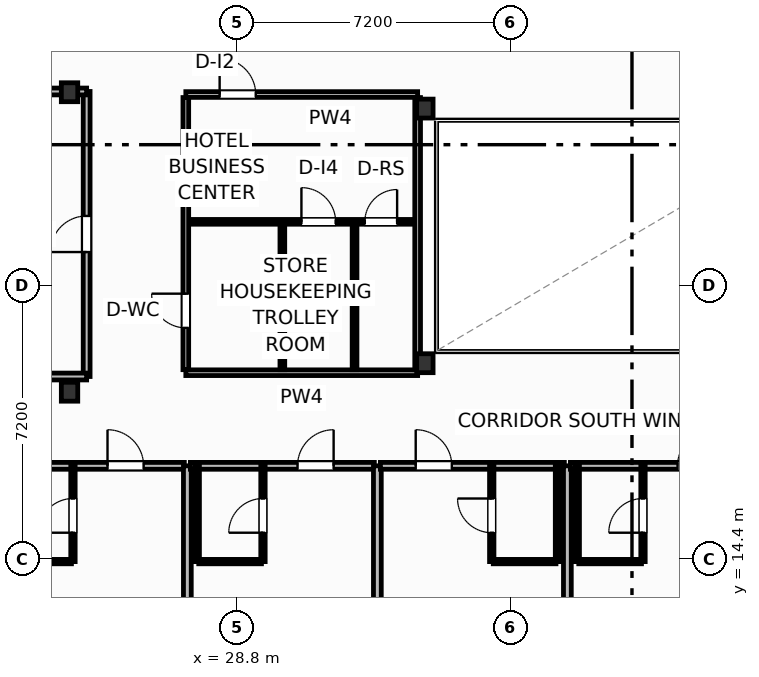
"""IFC4 building model, lengths in metres.
Left out: names, types, materials, properties, quantities, classifications, styles, units other than length and angle.
Written with IfcOpenShell. Run it as: python <this file> out.ifc"""

import sys

from ifc_helpers import new_model, si_unit, direction, frame, frame_2d, origin, origin_2d, place, context, subcontext, project, spatial, rectangle, i_section, extrude, element, fill, save


model = new_model("IFC4")
c1 = context("Model", 3, precision=1e-05, world=origin(), true_north=direction((0.0, 1.0)))
c2 = subcontext(c1, "Body", "Model", "MODEL_VIEW")
j1 = project(units=[si_unit("LENGTHUNIT", "METRE"), si_unit("PLANEANGLEUNIT", "RADIAN")], contexts=[c1])
p1 = place(None, origin())
s1 = spatial("IfcSite", under=j1, at=p1, CompositionType="ELEMENT")
p2 = place(p1, origin())
s2 = spatial("IfcBuilding", under=s1, at=p2, CompositionType="ELEMENT")
p3 = place(p2, frame((0.0, 0.0, 30.7)))
s3 = spatial("IfcBuildingStorey", under=s2, at=p3, CompositionType="ELEMENT", Elevation=30.7)
for number, where, z_axis, x_axis in (
    (1, (33.75, 19.55, 0.0), (0.0, 0.0, 1.0), (1.0, 0.0, 0.0)),
    (2, (33.75, 26.25, 0.0), (0.0, 0.0, 1.0), (1.0, 0.0, 0.0)),
    (3, (24.4, 18.8, 0.0), (0.0, 0.0, 1.0), (1.0, 0.0, 0.0)),
    (4, (24.4, 26.68, 0.0), (0.0, 0.0, 1.0), (1.0, 0.0, 0.0)),
):
    element("IfcColumn", number, at=place(p3, frame(where, z_axis=z_axis, x_axis=x_axis)), inside=s3, PredefinedType="COLUMN", context=c2, shape_type="SweptSolid", body=[
        extrude(i_section(OverallWidth=0.432, OverallDepth=0.498, WebThickness=0.056, FlangeThickness=0.089, FilletRadius=0.025, at=origin_2d()), origin(), (0.0, 0.0, 1.0), 3.7),
    ])
p4 = place(p3, frame((22.58, 16.85, 0.0), z_axis=(0.0, 0.0, 1.0), x_axis=(1.0, 0.0, 0.0)))
e5 = element("IfcWall", 5, at=p4, inside=s3, PredefinedType="PARTITIONING", context=c2, shape_type="SweptSolid", body=[
    extrude(rectangle(XDim=4.84, YDim=0.18, at=frame_2d((2.42, 0.0))), origin(), (0.0, 0.0, 1.0), 3.45),
])
p5 = place(p4, frame((2.819, 0.0, 0.0)))
e6 = element("IfcOpeningElement", 6, at=p5, cuts=e5, PredefinedType="OPENING", context=c2, shape_type="SweptSolid", body=[
    extrude(rectangle(XDim=0.95, YDim=2.15, at=frame_2d((0.475, 1.075))), frame((0.0, 0.1, 0.0), z_axis=(0.0, -1.0, 0.0), x_axis=(1.0, 0.0, 0.0)), (0.0, 0.0, 1.0), 0.2),
])
p6 = place(p3, frame((22.8, 14.33, 0.0), z_axis=(0.0, 0.0, 1.0), x_axis=(1.0, 0.0, 0.0)))
e7 = element("IfcWall", 7, at=p6, inside=s3, PredefinedType="PARTITIONING", context=c2, shape_type="SweptSolid", body=[
    extrude(rectangle(XDim=1.65, YDim=0.115, at=frame_2d((0.825, 0.0))), origin(), (0.0, 0.0, 1.0), 3.45),
])
p7 = place(p3, frame((24.49, 14.33, 0.0), z_axis=(0.0, 0.0, 1.0), x_axis=(0.0, 1.0, 0.0)))
e8 = element("IfcWall", 8, at=p7, inside=s3, PredefinedType="PARTITIONING", context=c2, shape_type="SweptSolid", body=[
    extrude(rectangle(XDim=2.52, YDim=0.115, at=frame_2d((1.26, 0.0))), origin(), (0.0, 0.0, 1.0), 3.45),
])
p8 = place(p7, frame((0.76, 0.0, 0.0)))
e9 = element("IfcOpeningElement", 9, at=p8, cuts=e8, PredefinedType="OPENING", context=c2, shape_type="SweptSolid", body=[
    extrude(rectangle(XDim=0.9, YDim=2.05, at=frame_2d((0.45, 1.025))), frame((0.0, 0.067, 0.0), z_axis=(0.0, -1.0, 0.0), x_axis=(1.0, 0.0, 0.0)), (0.0, 0.0, 1.0), 0.135),
])
p9 = place(p3, frame((27.5, 2.808, 0.0), z_axis=(0.0, 0.0, 1.0), x_axis=(0.0, 1.0, 0.0)))
e10 = element("IfcWall", 10, at=p9, inside=s3, PredefinedType="PARTITIONING", context=c2, shape_type="SweptSolid", body=[
    extrude(rectangle(XDim=14.042, YDim=0.205, at=frame_2d((7.021, 0.0))), origin(), (0.0, 0.0, 1.0), 3.45),
])
p10 = place(p3, frame((27.58, 16.85, 0.0), z_axis=(0.0, 0.0, 1.0), x_axis=(1.0, 0.0, 0.0)))
e11 = element("IfcWall", 11, at=p10, inside=s3, PredefinedType="PARTITIONING", context=c2, shape_type="SweptSolid", body=[
    extrude(rectangle(XDim=4.84, YDim=0.18, at=frame_2d((2.42, 0.0))), origin(), (0.0, 0.0, 1.0), 3.45),
])
p11 = place(p10, frame((2.819, 0.0, 0.0)))
e12 = element("IfcOpeningElement", 12, at=p11, cuts=e11, PredefinedType="OPENING", context=c2, shape_type="SweptSolid", body=[
    extrude(rectangle(XDim=0.95, YDim=2.15, at=frame_2d((0.475, 1.075))), frame((0.0, 0.1, 0.0), z_axis=(0.0, -1.0, 0.0), x_axis=(1.0, 0.0, 0.0)), (0.0, 0.0, 1.0), 0.2),
])
p12 = place(p3, frame((27.8, 14.33, 0.0), z_axis=(0.0, 0.0, 1.0), x_axis=(1.0, 0.0, 0.0)))
e13 = element("IfcWall", 13, at=p12, inside=s3, PredefinedType="PARTITIONING", context=c2, shape_type="SweptSolid", body=[
    extrude(rectangle(XDim=1.65, YDim=0.115, at=frame_2d((0.825, 0.0))), origin(), (0.0, 0.0, 1.0), 3.45),
])
p13 = place(p3, frame((29.49, 14.33, 0.0), z_axis=(0.0, 0.0, 1.0), x_axis=(0.0, 1.0, 0.0)))
e14 = element("IfcWall", 14, at=p13, inside=s3, PredefinedType="PARTITIONING", context=c2, shape_type="SweptSolid", body=[
    extrude(rectangle(XDim=2.52, YDim=0.115, at=frame_2d((1.26, 0.0))), origin(), (0.0, 0.0, 1.0), 3.45),
])
p14 = place(p13, frame((0.76, 0.0, 0.0)))
e15 = element("IfcOpeningElement", 15, at=p14, cuts=e14, PredefinedType="OPENING", context=c2, shape_type="SweptSolid", body=[
    extrude(rectangle(XDim=0.9, YDim=2.05, at=frame_2d((0.45, 1.025))), frame((0.0, 0.067, 0.0), z_axis=(0.0, -1.0, 0.0), x_axis=(1.0, 0.0, 0.0)), (0.0, 0.0, 1.0), 0.135),
])
p15 = place(p3, frame((27.76, 14.33, 0.0), z_axis=(0.0, 0.0, 1.0), x_axis=(0.0, 1.0, 0.0)))
e16 = element("IfcWall", 16, at=p15, inside=s3, PredefinedType="PARTITIONING", context=c2, shape_type="SweptSolid", body=[
    extrude(rectangle(XDim=2.52, YDim=0.115, at=frame_2d((1.26, 0.0))), origin(), (0.0, 0.0, 1.0), 3.45),
])
p16 = place(p3, frame((32.5, 1.914, 0.0), z_axis=(0.0, 0.0, 1.0), x_axis=(0.0, 1.0, 0.0)))
e17 = element("IfcWall", 17, at=p16, inside=s3, PredefinedType="PARTITIONING", context=c2, shape_type="SweptSolid", body=[
    extrude(rectangle(XDim=14.936, YDim=0.205, at=frame_2d((7.468, 0.0))), origin(), (0.0, 0.0, 1.0), 2.58),
])
p17 = place(p3, frame((32.58, 16.85, 0.0), z_axis=(0.0, 0.0, 1.0), x_axis=(1.0, 0.0, 0.0)))
e18 = element("IfcWall", 18, at=p17, inside=s3, PredefinedType="PARTITIONING", context=c2, shape_type="SweptSolid", body=[
    extrude(rectangle(XDim=4.84, YDim=0.18, at=frame_2d((2.42, 0.0))), origin(), (0.0, 0.0, 1.0), 3.45),
])
p18 = place(p17, frame((0.929, 0.0, 0.0)))
e19 = element("IfcOpeningElement", 19, at=p18, cuts=e18, PredefinedType="OPENING", context=c2, shape_type="SweptSolid", body=[
    extrude(rectangle(XDim=0.95, YDim=2.15, at=frame_2d((0.475, 1.075))), frame((0.0, 0.1, 0.0), z_axis=(0.0, -1.0, 0.0), x_axis=(1.0, 0.0, 0.0)), (0.0, 0.0, 1.0), 0.2),
])
p19 = place(p3, frame((35.55, 14.33, 0.0), z_axis=(0.0, 0.0, 1.0), x_axis=(1.0, 0.0, 0.0)))
e20 = element("IfcWall", 20, at=p19, inside=s3, PredefinedType="PARTITIONING", context=c2, shape_type="SweptSolid", body=[
    extrude(rectangle(XDim=1.65, YDim=0.115, at=frame_2d((0.825, 0.0))), origin(), (0.0, 0.0, 1.0), 3.45),
])
p20 = place(p3, frame((35.51, 14.33, 0.0), z_axis=(0.0, 0.0, 1.0), x_axis=(0.0, 1.0, 0.0)))
e21 = element("IfcWall", 21, at=p20, inside=s3, PredefinedType="PARTITIONING", context=c2, shape_type="SweptSolid", body=[
    extrude(rectangle(XDim=2.52, YDim=0.115, at=frame_2d((1.26, 0.0))), origin(), (0.0, 0.0, 1.0), 3.45),
])
p21 = place(p20, frame((0.76, 0.0, 0.0)))
e22 = element("IfcOpeningElement", 22, at=p21, cuts=e21, PredefinedType="OPENING", context=c2, shape_type="SweptSolid", body=[
    extrude(rectangle(XDim=0.9, YDim=2.05, at=frame_2d((0.45, 1.025))), frame((0.0, 0.067, 0.0), z_axis=(0.0, -1.0, 0.0), x_axis=(1.0, 0.0, 0.0)), (0.0, 0.0, 1.0), 0.135),
])
p22 = place(p3, frame((37.24, 14.33, 0.0), z_axis=(0.0, 0.0, 1.0), x_axis=(0.0, 1.0, 0.0)))
e23 = element("IfcWall", 23, at=p22, inside=s3, PredefinedType="PARTITIONING", context=c2, shape_type="SweptSolid", body=[
    extrude(rectangle(XDim=2.52, YDim=0.115, at=frame_2d((1.26, 0.0))), origin(), (0.0, 0.0, 1.0), 3.45),
])
p23 = place(p3, frame((37.5, -4.0, 0.0), z_axis=(0.0, 0.0, 1.0), x_axis=(0.0, 1.0, 0.0)))
e24 = element("IfcWall", 24, at=p23, inside=s3, PredefinedType="PARTITIONING", context=c2, shape_type="SweptSolid", body=[
    extrude(rectangle(XDim=20.85, YDim=0.205, at=frame_2d((10.425, 0.0))), origin(), (0.0, 0.0, 1.0), 3.45),
])
p24 = place(p3, frame((37.58, 16.85, 0.0), z_axis=(0.0, 0.0, 1.0), x_axis=(1.0, 0.0, 0.0)))
e25 = element("IfcWall", 25, at=p24, inside=s3, PredefinedType="PARTITIONING", context=c2, shape_type="SweptSolid", body=[
    extrude(rectangle(XDim=4.84, YDim=0.18, at=frame_2d((2.42, 0.0))), origin(), (0.0, 0.0, 1.0), 3.45),
])
p25 = place(p24, frame((2.819, 0.0, 0.0)))
e26 = element("IfcOpeningElement", 26, at=p25, cuts=e25, PredefinedType="OPENING", context=c2, shape_type="SweptSolid", body=[
    extrude(rectangle(XDim=0.95, YDim=2.15, at=frame_2d((0.475, 1.075))), frame((0.0, 0.1, 0.0), z_axis=(0.0, -1.0, 0.0), x_axis=(1.0, 0.0, 0.0)), (0.0, 0.0, 1.0), 0.2),
])
p26 = place(p3, frame((37.8, 14.33, 0.0), z_axis=(0.0, 0.0, 1.0), x_axis=(1.0, 0.0, 0.0)))
e27 = element("IfcWall", 27, at=p26, inside=s3, PredefinedType="PARTITIONING", context=c2, shape_type="SweptSolid", body=[
    extrude(rectangle(XDim=1.65, YDim=0.115, at=frame_2d((0.825, 0.0))), origin(), (0.0, 0.0, 1.0), 3.45),
])
p27 = place(p3, frame((39.49, 14.33, 0.0), z_axis=(0.0, 0.0, 1.0), x_axis=(0.0, 1.0, 0.0)))
e28 = element("IfcWall", 28, at=p27, inside=s3, PredefinedType="PARTITIONING", context=c2, shape_type="SweptSolid", body=[
    extrude(rectangle(XDim=2.52, YDim=0.115, at=frame_2d((1.26, 0.0))), origin(), (0.0, 0.0, 1.0), 3.45),
])
p28 = place(p27, frame((0.76, 0.0, 0.0)))
e29 = element("IfcOpeningElement", 29, at=p28, cuts=e28, PredefinedType="OPENING", context=c2, shape_type="SweptSolid", body=[
    extrude(rectangle(XDim=0.9, YDim=2.05, at=frame_2d((0.45, 1.025))), frame((0.0, 0.067, 0.0), z_axis=(0.0, -1.0, 0.0), x_axis=(1.0, 0.0, 0.0)), (0.0, 0.0, 1.0), 0.135),
])
p29 = place(p3, frame((37.76, 14.33, 0.0), z_axis=(0.0, 0.0, 1.0), x_axis=(0.0, 1.0, 0.0)))
e30 = element("IfcWall", 30, at=p29, inside=s3, PredefinedType="PARTITIONING", context=c2, shape_type="SweptSolid", body=[
    extrude(rectangle(XDim=2.52, YDim=0.115, at=frame_2d((1.26, 0.0))), origin(), (0.0, 0.0, 1.0), 3.45),
])
p30 = place(p3, frame((24.85, 19.2, 0.0), z_axis=(0.0, 0.0, 1.0), x_axis=(0.0, 1.0, 0.0)))
e31 = element("IfcWall", 31, at=p30, inside=s3, PredefinedType="PARTITIONING", context=c2, shape_type="SweptSolid", body=[
    extrude(rectangle(XDim=7.5, YDim=0.18, at=frame_2d((3.75, 0.0))), origin(), (0.0, 0.0, 1.0), 3.45),
])
p31 = place(p30, frame((3.275, 0.0, 0.0)))
e32 = element("IfcOpeningElement", 32, at=p31, cuts=e31, PredefinedType="OPENING", context=c2, shape_type="SweptSolid", body=[
    extrude(rectangle(XDim=0.95, YDim=2.05, at=frame_2d((0.475, 1.025))), frame((0.0, 0.1, 0.0), z_axis=(0.0, -1.0, 0.0), x_axis=(1.0, 0.0, 0.0)), (0.0, 0.0, 1.0), 0.2),
])
p32 = place(p3, frame((3.703, 19.2, 0.0), z_axis=(0.0, 0.0, 1.0), x_axis=(1.0, 0.0, 0.0)))
e33 = element("IfcWall", 33, at=p32, inside=s3, PredefinedType="PARTITIONING", context=c2, shape_type="SweptSolid", body=[
    extrude(rectangle(XDim=21.147, YDim=0.18, at=frame_2d((10.574, 0.0))), origin(), (0.0, 0.0, 1.0), 2.58),
])
p33 = place(p3, frame((0.2, 26.7, 0.0), z_axis=(0.0, 0.0, 1.0), x_axis=(1.0, 0.0, 0.0)))
e34 = element("IfcWall", 34, at=p33, inside=s3, PredefinedType="PARTITIONING", context=c2, shape_type="SweptSolid", body=[
    extrude(rectangle(XDim=24.65, YDim=0.18, at=frame_2d((12.325, 0.0))), origin(), (0.0, 0.0, 1.0), 2.662),
])
p34 = place(p3, frame((27.46, 26.62, 0.0), z_axis=(0.0, 0.0, 1.0), x_axis=(1.0, 0.0, 0.0)))
e35 = element("IfcWall", 35, at=p34, inside=s3, PredefinedType="PARTITIONING", context=c2, shape_type="SweptSolid", body=[
    extrude(rectangle(XDim=6.1, YDim=0.15, at=frame_2d((3.05, 0.0))), origin(), (0.0, 0.0, 1.0), 2.662),
])
p35 = place(p34, frame((0.89, 0.0, 0.0)))
e36 = element("IfcOpeningElement", 36, at=p35, cuts=e35, PredefinedType="OPENING", context=c2, shape_type="SweptSolid", body=[
    extrude(rectangle(XDim=0.95, YDim=2.05, at=frame_2d((0.475, 1.025))), frame((0.0, 0.085, 0.0), z_axis=(0.0, -1.0, 0.0), x_axis=(1.0, 0.0, 0.0)), (0.0, 0.0, 1.0), 0.17),
])
p36 = place(p3, frame((27.46, 19.3, 0.0), z_axis=(0.0, 0.0, 1.0), x_axis=(1.0, 0.0, 0.0)))
e37 = element("IfcWall", 37, at=p36, inside=s3, PredefinedType="PARTITIONING", context=c2, shape_type="SweptSolid", body=[
    extrude(rectangle(XDim=6.1, YDim=0.15, at=frame_2d((3.05, 0.0))), origin(), (0.0, 0.0, 1.0), 2.662),
])
p37 = place(p3, frame((27.52, 23.27, 0.0), z_axis=(0.0, 0.0, 1.0), x_axis=(1.0, 0.0, 0.0)))
e38 = element("IfcWall", 38, at=p37, inside=s3, PredefinedType="PARTITIONING", context=c2, shape_type="SweptSolid", body=[
    extrude(rectangle(XDim=6.0, YDim=0.125, at=frame_2d((3.0, 0.0))), origin(), (0.0, 0.0, 1.0), 3.45),
])
p38 = place(p37, frame((2.982, 0.0, 0.0)))
e39 = element("IfcOpeningElement", 39, at=p38, cuts=e38, PredefinedType="OPENING", context=c2, shape_type="SweptSolid", body=[
    extrude(rectangle(XDim=0.9, YDim=2.05, at=frame_2d((0.45, 1.025))), frame((0.0, 0.073, 0.0), z_axis=(0.0, -1.0, 0.0), x_axis=(1.0, 0.0, 0.0)), (0.0, 0.0, 1.0), 0.145),
])
p39 = place(p37, frame((4.65, 0.0, 0.0)))
e40 = element("IfcOpeningElement", 40, at=p39, cuts=e38, PredefinedType="OPENING", context=c2, shape_type="SweptSolid", body=[
    extrude(rectangle(XDim=0.85, YDim=2.05, at=frame_2d((0.425, 1.025))), frame((0.0, 0.073, 0.0), z_axis=(0.0, -1.0, 0.0), x_axis=(1.0, 0.0, 0.0)), (0.0, 0.0, 1.0), 0.145),
])
for number, where, z_axis, x_axis in (
    (41, (30.0, 19.38, 0.0), (0.0, 0.0, 1.0), (0.0, 1.0, 0.0)),
    (42, (31.9, 19.38, 0.0), (0.0, 0.0, 1.0), (0.0, 1.0, 0.0)),
):
    element("IfcWall", number, at=place(p3, frame(where, z_axis=z_axis, x_axis=x_axis)), inside=s3, PredefinedType="PARTITIONING", context=c2, shape_type="SweptSolid", body=[
        extrude(rectangle(XDim=3.82, YDim=0.125, at=frame_2d((1.91, 0.0))), origin(), (0.0, 0.0, 1.0), 3.45),
    ])
p40 = place(p3, frame((27.46, 19.38, 0.0), z_axis=(0.0, 0.0, 1.0), x_axis=(0.0, 1.0, 0.0)))
e43 = element("IfcWall", 43, at=p40, inside=s3, PredefinedType="PARTITIONING", context=c2, shape_type="SweptSolid", body=[
    extrude(rectangle(XDim=7.16, YDim=0.15, at=frame_2d((3.58, 0.0))), origin(), (0.0, 0.0, 1.0), 3.45),
])
p41 = place(p40, frame((1.1, 0.0, 0.0)))
e44 = element("IfcOpeningElement", 44, at=p41, cuts=e43, PredefinedType="OPENING", context=c2, shape_type="SweptSolid", body=[
    extrude(rectangle(XDim=0.9, YDim=2.05, at=frame_2d((0.45, 1.025))), frame((0.0, 0.085, 0.0), z_axis=(0.0, -1.0, 0.0), x_axis=(1.0, 0.0, 0.0)), (0.0, 0.0, 1.0), 0.17),
])
p42 = place(p3, frame((33.56, 19.38, 0.0), z_axis=(0.0, 0.0, 1.0), x_axis=(0.0, 1.0, 0.0)))
e45 = element("IfcWall", 45, at=p42, inside=s3, PredefinedType="PARTITIONING", context=c2, shape_type="SweptSolid", body=[
    extrude(rectangle(XDim=7.16, YDim=0.15, at=frame_2d((3.58, 0.0))), origin(), (0.0, 0.0, 1.0), 2.824),
])
p43 = place(p5, origin())
e46 = element("IfcDoor", 46, at=p43, inside=s3, OperationType="SINGLE_SWING_LEFT", PredefinedType="DOOR", context=c2, shape_type="SweptSolid", body=[
    extrude(rectangle(XDim=0.95, YDim=2.15, at=frame_2d((0.475, 1.075))), frame((0.0, 0.025, 0.0), z_axis=(0.0, -1.0, 0.0), x_axis=(1.0, 0.0, 0.0)), (0.0, 0.0, 1.0), 0.05),
])
fill(e6, e46)
p44 = place(p8, origin())
e47 = element("IfcDoor", 47, at=p44, inside=s3, OperationType="SINGLE_SWING_LEFT", PredefinedType="DOOR", context=c2, shape_type="SweptSolid", body=[
    extrude(rectangle(XDim=0.9, YDim=2.05, at=frame_2d((0.45, 1.025))), frame((0.0, 0.025, 0.0), z_axis=(0.0, -1.0, 0.0), x_axis=(1.0, 0.0, 0.0)), (0.0, 0.0, 1.0), 0.05),
])
fill(e9, e47)
p45 = place(p11, origin())
e48 = element("IfcDoor", 48, at=p45, inside=s3, OperationType="SINGLE_SWING_RIGHT", PredefinedType="DOOR", context=c2, shape_type="SweptSolid", body=[
    extrude(rectangle(XDim=0.95, YDim=2.15, at=frame_2d((0.475, 1.075))), frame((0.0, 0.025, 0.0), z_axis=(0.0, -1.0, 0.0), x_axis=(1.0, 0.0, 0.0)), (0.0, 0.0, 1.0), 0.05),
])
fill(e12, e48)
p46 = place(p14, origin())
e49 = element("IfcDoor", 49, at=p46, inside=s3, OperationType="SINGLE_SWING_LEFT", PredefinedType="DOOR", context=c2, shape_type="SweptSolid", body=[
    extrude(rectangle(XDim=0.9, YDim=2.05, at=frame_2d((0.45, 1.025))), frame((0.0, 0.025, 0.0), z_axis=(0.0, -1.0, 0.0), x_axis=(1.0, 0.0, 0.0)), (0.0, 0.0, 1.0), 0.05),
])
fill(e15, e49)
p47 = place(p18, origin())
e50 = element("IfcDoor", 50, at=p47, inside=s3, OperationType="SINGLE_SWING_LEFT", PredefinedType="DOOR", context=c2, shape_type="SweptSolid", body=[
    extrude(rectangle(XDim=0.95, YDim=2.15, at=frame_2d((0.475, 1.075))), frame((0.0, 0.025, 0.0), z_axis=(0.0, -1.0, 0.0), x_axis=(1.0, 0.0, 0.0)), (0.0, 0.0, 1.0), 0.05),
])
fill(e19, e50)
p48 = place(p21, origin())
e51 = element("IfcDoor", 51, at=p48, inside=s3, OperationType="SINGLE_SWING_RIGHT", PredefinedType="DOOR", context=c2, shape_type="SweptSolid", body=[
    extrude(rectangle(XDim=0.9, YDim=2.05, at=frame_2d((0.45, 1.025))), frame((0.0, 0.025, 0.0), z_axis=(0.0, -1.0, 0.0), x_axis=(1.0, 0.0, 0.0)), (0.0, 0.0, 1.0), 0.05),
])
fill(e22, e51)
p49 = place(p25, origin())
e52 = element("IfcDoor", 52, at=p49, inside=s3, OperationType="SINGLE_SWING_RIGHT", PredefinedType="DOOR", context=c2, shape_type="SweptSolid", body=[
    extrude(rectangle(XDim=0.95, YDim=2.15, at=frame_2d((0.475, 1.075))), frame((0.0, 0.025, 0.0), z_axis=(0.0, -1.0, 0.0), x_axis=(1.0, 0.0, 0.0)), (0.0, 0.0, 1.0), 0.05),
])
fill(e26, e52)
p50 = place(p28, origin())
e53 = element("IfcDoor", 53, at=p50, inside=s3, OperationType="SINGLE_SWING_LEFT", PredefinedType="DOOR", context=c2, shape_type="SweptSolid", body=[
    extrude(rectangle(XDim=0.9, YDim=2.05, at=frame_2d((0.45, 1.025))), frame((0.0, 0.025, 0.0), z_axis=(0.0, -1.0, 0.0), x_axis=(1.0, 0.0, 0.0)), (0.0, 0.0, 1.0), 0.05),
])
fill(e29, e53)
p51 = place(p31, origin())
e54 = element("IfcDoor", 54, at=p51, inside=s3, OperationType="SINGLE_SWING_LEFT", PredefinedType="DOOR", context=c2, shape_type="SweptSolid", body=[
    extrude(rectangle(XDim=0.95, YDim=2.05, at=frame_2d((0.475, 1.025))), frame((0.0, 0.025, 0.0), z_axis=(0.0, -1.0, 0.0), x_axis=(1.0, 0.0, 0.0)), (0.0, 0.0, 1.0), 0.05),
])
fill(e32, e54)
p52 = place(p35, origin())
e55 = element("IfcDoor", 55, at=p52, inside=s3, OperationType="SINGLE_SWING_LEFT", PredefinedType="DOOR", context=c2, shape_type="SweptSolid", body=[
    extrude(rectangle(XDim=0.95, YDim=2.05, at=frame_2d((0.475, 1.025))), frame((0.0, 0.025, 0.0), z_axis=(0.0, -1.0, 0.0), x_axis=(1.0, 0.0, 0.0)), (0.0, 0.0, 1.0), 0.05),
])
fill(e36, e55)
p53 = place(p38, origin())
e56 = element("IfcDoor", 56, at=p53, inside=s3, OperationType="SINGLE_SWING_LEFT", PredefinedType="DOOR", context=c2, shape_type="SweptSolid", body=[
    extrude(rectangle(XDim=0.9, YDim=2.05, at=frame_2d((0.45, 1.025))), frame((0.0, 0.025, 0.0), z_axis=(0.0, -1.0, 0.0), x_axis=(1.0, 0.0, 0.0)), (0.0, 0.0, 1.0), 0.05),
])
fill(e39, e56)
p54 = place(p39, origin())
e57 = element("IfcDoor", 57, at=p54, inside=s3, OperationType="SINGLE_SWING_RIGHT", PredefinedType="DOOR", context=c2, shape_type="SweptSolid", body=[
    extrude(rectangle(XDim=0.85, YDim=2.05, at=frame_2d((0.425, 1.025))), frame((0.0, 0.025, 0.0), z_axis=(0.0, -1.0, 0.0), x_axis=(1.0, 0.0, 0.0)), (0.0, 0.0, 1.0), 0.05),
])
fill(e40, e57)
p55 = place(p41, origin())
e58 = element("IfcDoor", 58, at=p55, inside=s3, OperationType="SINGLE_SWING_RIGHT", PredefinedType="DOOR", context=c2, shape_type="SweptSolid", body=[
    extrude(rectangle(XDim=0.9, YDim=2.05, at=frame_2d((0.45, 1.025))), frame((0.0, 0.025, 0.0), z_axis=(0.0, -1.0, 0.0), x_axis=(1.0, 0.0, 0.0)), (0.0, 0.0, 1.0), 0.05),
])
fill(e44, e58)
save(model, sys.argv[1])
